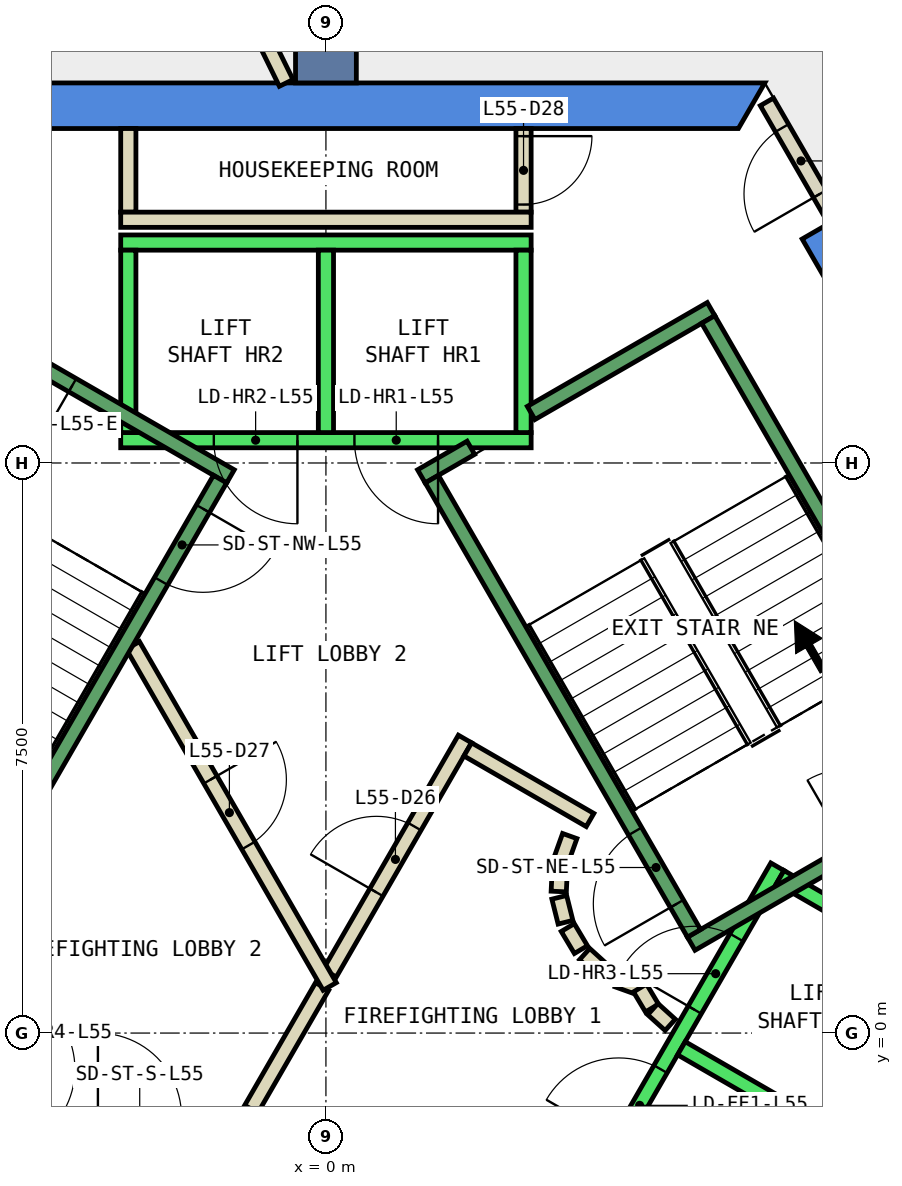
"""IFC4 building model, lengths in metres.
Left out: names, types, materials, properties, quantities, classifications, styles, units other than length and angle.
Written with IfcOpenShell. Run it as: python <this file> out.ifc"""

import sys

from ifc_helpers import new_model, si_unit, direction, frame, frame_2d, origin, place, context, subcontext, project, spatial, polyline, rectangle, outline, extrude, element, fill, save


model = new_model("IFC4")
c1 = context("Model", 3, precision=1e-05, world=origin(), true_north=direction((0.0, 1.0)))
c2 = subcontext(c1, "Body", "Model", "MODEL_VIEW")
j1 = project(units=[si_unit("LENGTHUNIT", "METRE"), si_unit("PLANEANGLEUNIT", "RADIAN")], contexts=[c1])
p1 = place(None, origin())
s1 = spatial("IfcSite", under=j1, at=p1, CompositionType="ELEMENT")
p2 = place(p1, origin())
s2 = spatial("IfcBuilding", under=s1, at=p2, CompositionType="ELEMENT")
p3 = place(p2, frame((0.0, 0.0, 245.0)))
s3 = spatial("IfcBuildingStorey", under=s2, at=p3, CompositionType="ELEMENT", Elevation=245.0)
p4 = place(p3, frame((0.0, 0.0, -0.34)))
e1 = element("IfcWall", 1, at=p4, inside=s3, PredefinedType="SHEAR", context=c2, shape_type="SweptSolid", body=[
    extrude(outline(polyline([(6.786, 10.747), (6.266, 10.447), (10.854, 2.5), (11.547, 2.5), (6.786, 10.747)])), origin(), (0.0, 0.0, 1.0), 3.6),
])
p5 = place(p3, frame((0.0, 0.0, -0.34)))
e2 = element("IfcWall", 2, at=p5, inside=s3, PredefinedType="SHEAR", context=c2, shape_type="SweptSolid", body=[
    extrude(outline(polyline([(5.774, 12.5), (-5.774, 12.5), (-5.427, 11.9), (5.427, 11.9), (5.774, 12.5)])), origin(), (0.0, 0.0, 1.0), 3.6),
])
p6 = place(p3, frame((0.0, 0.0, -0.34)))
e3 = element("IfcWall", 3, at=p6, inside=s3, PredefinedType="SHEAR", context=c2, shape_type="SweptSolid", body=[
    extrude(outline(polyline([(5.774, -7.5), (11.547, 2.5), (10.854, 2.5), (5.427, -6.9), (5.774, -7.5)])), origin(), (0.0, 0.0, 1.0), 3.6),
])
p7 = place(p3, frame((0.0, 12.5, -0.34), z_axis=(0.0, 0.0, 1.0), x_axis=(0.0, 1.0, 0.0)))
e4 = element("IfcWall", 4, at=p7, inside=s3, PredefinedType="SHEAR", context=c2, shape_type="SweptSolid", body=[
    extrude(rectangle(XDim=9.0, YDim=0.8, at=frame_2d((4.5, 0.0))), origin(), (0.0, 0.0, 1.0), 3.6),
])
p8 = place(p3, frame((-0.523, 12.5, 0.0), z_axis=(0.0, 0.0, 1.0), x_axis=(-0.440503659888, 0.897750814884, 0.0)))
e5 = element("IfcWall", 5, at=p8, inside=s3, PredefinedType="PARTITIONING", context=c2, shape_type="SweptSolid", body=[
    extrude(rectangle(XDim=1.793, YDim=0.2, at=frame_2d((0.897, 0.0))), origin(), (0.0, 0.0, 1.0), 3.26),
])
p9 = place(p3, frame((-2.6, 10.8, 0.0), z_axis=(0.0, 0.0, 1.0), x_axis=(0.0, 1.0, 0.0)))
e6 = element("IfcWall", 6, at=p9, inside=s3, PredefinedType="PARTITIONING", context=c2, shape_type="SweptSolid", body=[
    extrude(rectangle(XDim=1.1, YDim=0.2, at=frame_2d((0.55, 0.0))), origin(), (0.0, 0.0, 1.0), 3.26),
])
p10 = place(p3, frame((2.6, 11.9, 0.0), z_axis=(0.0, 0.0, 1.0), x_axis=(0.0, -1.0, 0.0)))
e7 = element("IfcWall", 7, at=p10, inside=s3, PredefinedType="PARTITIONING", context=c2, shape_type="SweptSolid", body=[
    extrude(rectangle(XDim=1.1, YDim=0.2, at=frame_2d((0.55, 0.0))), origin(), (0.0, 0.0, 1.0), 3.26),
])
p11 = place(p10, frame((0.1, 0.0, 0.0)))
e8 = element("IfcOpeningElement", 8, at=p11, cuts=e7, PredefinedType="OPENING", context=c2, shape_type="SweptSolid", body=[
    extrude(rectangle(XDim=0.9, YDim=2.1, at=frame_2d((0.45, 1.05))), frame((0.0, 0.11, 0.0), z_axis=(0.0, -1.0, 0.0), x_axis=(1.0, 0.0, 0.0)), (0.0, 0.0, 1.0), 0.22),
])
p12 = place(p3, frame((2.7, 10.7, 0.0), z_axis=(0.0, 0.0, 1.0), x_axis=(-1.0, 0.0, 0.0)))
e9 = element("IfcWall", 9, at=p12, inside=s3, PredefinedType="PARTITIONING", context=c2, shape_type="SweptSolid", body=[
    extrude(rectangle(XDim=5.4, YDim=0.2, at=frame_2d((2.7, 0.0))), origin(), (0.0, 0.0, 1.0), 3.26),
])
p13 = place(p3, frame((5.751, -3.938, 0.0), z_axis=(0.0, 0.0, 1.0), x_axis=(0.500034260056, 0.866005622828, 0.0)))
e10 = element("IfcWall", 10, at=p13, inside=s3, PredefinedType="PARTITIONING", context=c2, shape_type="SweptSolid", body=[
    extrude(rectangle(XDim=5.399, YDim=0.2, at=frame_2d((2.7, 0.0))), origin(), (0.0, 0.0, 1.0), 3.26),
])
p14 = place(p3, frame((-0.982, -1.0, 0.0), z_axis=(0.0, 0.0, 1.0), x_axis=(0.50024047865, 0.865886518847, 0.0)))
e11 = element("IfcWall", 11, at=p14, inside=s3, PredefinedType="PARTITIONING", context=c2, shape_type="SweptSolid", body=[
    extrude(rectangle(XDim=1.863, YDim=0.2, at=frame_2d((0.931, 0.0))), origin(), (0.0, 0.0, 1.0), 3.26),
])
p15 = place(p3, frame((0.05, 0.787, 0.0), z_axis=(0.0, 0.0, 1.0), x_axis=(0.499954076797, 0.866051915934, 0.0)))
e12 = element("IfcWall", 12, at=p15, inside=s3, PredefinedType="PARTITIONING", context=c2, shape_type="SweptSolid", body=[
    extrude(rectangle(XDim=3.558, YDim=0.2, at=frame_2d((1.779, 0.0))), origin(), (0.0, 0.0, 1.0), 3.26),
])
p16 = place(p15, frame((1.229, 0.0, 0.0)))
e13 = element("IfcOpeningElement", 13, at=p16, cuts=e12, PredefinedType="OPENING", context=c2, shape_type="SweptSolid", body=[
    extrude(rectangle(XDim=1.0, YDim=2.1, at=frame_2d((0.5, 1.05))), frame((0.0, 0.11, 0.0), z_axis=(0.0, -1.0, 0.0), x_axis=(1.0, 0.0, 0.0)), (0.0, 0.0, 1.0), 0.22),
])
p17 = place(p3, frame((1.866, 3.732, 0.0), z_axis=(0.0, 0.0, 1.0), x_axis=(0.866043361281, -0.499968895414, 0.0)))
e14 = element("IfcWall", 14, at=p17, inside=s3, PredefinedType="PARTITIONING", context=c2, shape_type="SweptSolid", body=[
    extrude(rectangle(XDim=1.858, YDim=0.2, at=frame_2d((0.929, 0.0))), origin(), (0.0, 0.0, 1.0), 3.26),
])
p18 = place(p3, frame((3.208, 2.592, 0.0), z_axis=(0.0, 0.0, 1.0), x_axis=(-0.337388820924, -0.941365382578, 0.0)))
e15 = element("IfcWall", 15, at=p18, inside=s3, PredefinedType="PARTITIONING", context=c2, shape_type="SweptSolid", body=[
    extrude(rectangle(XDim=0.338, YDim=0.2, at=frame_2d((0.169, 0.0))), origin(), (0.0, 0.0, 1.0), 3.26),
])
p19 = place(p3, frame((3.079, 2.199, 0.0), z_axis=(0.0, 0.0, 1.0), x_axis=(-0.047771483479, -0.998858290933, 0.0)))
e16 = element("IfcWall", 16, at=p19, inside=s3, PredefinedType="PARTITIONING", context=c2, shape_type="SweptSolid", body=[
    extrude(rectangle(XDim=0.337, YDim=0.2, at=frame_2d((0.169, 0.0))), origin(), (0.0, 0.0, 1.0), 3.26),
])
p20 = place(p3, frame((3.07, 1.786, 0.0), z_axis=(0.0, 0.0, 1.0), x_axis=(0.242705583207, -0.970099994784, 0.0)))
e17 = element("IfcWall", 17, at=p20, inside=s3, PredefinedType="PARTITIONING", context=c2, shape_type="SweptSolid", body=[
    extrude(rectangle(XDim=0.338, YDim=0.2, at=frame_2d((0.169, 0.0))), origin(), (0.0, 0.0, 1.0), 3.26),
])
for number, where, z_axis, x_axis in (
    (18, (3.182, 1.388, 0.0), (0.0, 0.0, 1.0), (0.512, -0.859, 0.0)),
    (19, (3.404, 1.039, 0.0), (0.0, 0.0, 1.0), (0.74, -0.672, 0.0)),
):
    element("IfcWall", number, at=place(p3, frame(where, z_axis=z_axis, x_axis=x_axis)), inside=s3, PredefinedType="PARTITIONING", context=c2, shape_type="SweptSolid", body=[
        extrude(rectangle(XDim=0.338, YDim=0.2, at=frame_2d((0.169, 0.0))), origin(), (0.0, 0.0, 1.0), 3.26),
    ])
p21 = place(p3, frame((3.838, 0.702, 0.0), z_axis=(0.0, 0.0, 1.0), x_axis=(0.941035081519, -0.338308993895, 0.0)))
e20 = element("IfcWall", 20, at=p21, inside=s3, PredefinedType="PARTITIONING", context=c2, shape_type="SweptSolid", body=[
    extrude(rectangle(XDim=0.337, YDim=0.2, at=frame_2d((0.168, 0.0))), origin(), (0.0, 0.0, 1.0), 3.26),
])
p22 = place(p3, frame((4.132, 0.593, 0.0), z_axis=(0.0, 0.0, 1.0), x_axis=(0.513561617048, -0.858052717201, 0.0)))
e21 = element("IfcWall", 21, at=p22, inside=s3, PredefinedType="PARTITIONING", context=c2, shape_type="SweptSolid", body=[
    extrude(rectangle(XDim=0.308, YDim=0.2, at=frame_2d((0.154, 0.0))), origin(), (0.0, 0.0, 1.0), 3.26),
])
p23 = place(p3, frame((4.301, 0.315, 0.0), z_axis=(0.0, 0.0, 1.0), x_axis=(0.741798017506, -0.670623367639, 0.0)))
e22 = element("IfcWall", 22, at=p23, inside=s3, PredefinedType="PARTITIONING", context=c2, shape_type="SweptSolid", body=[
    extrude(rectangle(XDim=0.309, YDim=0.2, at=frame_2d((0.154, 0.0))), origin(), (0.0, 0.0, 1.0), 3.26),
])
p24 = place(p3, frame((-2.54, 5.1, 0.0), z_axis=(0.0, 0.0, 1.0), x_axis=(0.499925051871, -0.866068670783, 0.0)))
e23 = element("IfcWall", 23, at=p24, inside=s3, PredefinedType="PARTITIONING", context=c2, shape_type="SweptSolid", body=[
    extrude(rectangle(XDim=5.181, YDim=0.2, at=frame_2d((2.59, 0.0))), origin(), (0.0, 0.0, 1.0), 3.26),
])
p25 = place(p24, frame((2.04, 0.0, 0.0)))
e24 = element("IfcOpeningElement", 24, at=p25, cuts=e23, PredefinedType="OPENING", context=c2, shape_type="SweptSolid", body=[
    extrude(rectangle(XDim=1.0, YDim=2.1, at=frame_2d((0.5, 1.05))), frame((0.0, 0.11, 0.0), z_axis=(0.0, -1.0, 0.0), x_axis=(1.0, 0.0, 0.0)), (0.0, 0.0, 1.0), 0.22),
])
p26 = place(p3, frame((6.699, 10.697, 0.0), z_axis=(0.0, 0.0, 1.0), x_axis=(-0.499914839587, 0.866074565589, 0.0)))
e25 = element("IfcWall", 25, at=p26, inside=s3, PredefinedType="PARTITIONING", context=c2, shape_type="SweptSolid", body=[
    extrude(rectangle(XDim=1.794, YDim=0.2, at=frame_2d((0.897, 0.0))), origin(), (0.0, 0.0, 1.0), 2.4),
])
p27 = place(p26, frame((0.397, 0.0, 0.0)))
e26 = element("IfcOpeningElement", 26, at=p27, cuts=e25, PredefinedType="OPENING", context=c2, shape_type="SweptSolid", body=[
    extrude(rectangle(XDim=1.0, YDim=2.1, at=frame_2d((0.5, 1.05))), frame((0.0, 0.11, 0.0), z_axis=(0.0, -1.0, 0.0), x_axis=(1.0, 0.0, 0.0)), (0.0, 0.0, 1.0), 0.22),
])
p28 = place(p3, frame((2.7, 7.8, 0.0), z_axis=(0.0, 0.0, 1.0), x_axis=(-1.0, 0.0, 0.0)))
e27 = element("IfcWall", 27, at=p28, inside=s3, PredefinedType="STANDARD", context=c2, shape_type="SweptSolid", body=[
    extrude(rectangle(XDim=5.4, YDim=0.2, at=frame_2d((2.7, 0.0))), origin(), (0.0, 0.0, 1.0), 3.26),
])
p29 = place(p28, frame((1.225, 0.0, 0.0)))
e28 = element("IfcOpeningElement", 28, at=p29, cuts=e27, PredefinedType="OPENING", context=c2, shape_type="SweptSolid", body=[
    extrude(rectangle(XDim=1.1, YDim=2.1, at=frame_2d((0.55, 1.05))), frame((0.0, 0.11, 0.0), z_axis=(0.0, -1.0, 0.0), x_axis=(1.0, 0.0, 0.0)), (0.0, 0.0, 1.0), 0.22),
])
p30 = place(p28, frame((3.075, 0.0, 0.0)))
e29 = element("IfcOpeningElement", 29, at=p30, cuts=e27, PredefinedType="OPENING", context=c2, shape_type="SweptSolid", body=[
    extrude(rectangle(XDim=1.1, YDim=2.1, at=frame_2d((0.55, 1.05))), frame((0.0, 0.11, 0.0), z_axis=(0.0, -1.0, 0.0), x_axis=(1.0, 0.0, 0.0)), (0.0, 0.0, 1.0), 0.22),
])
p31 = place(p3, frame((2.7, 10.4, 0.0), z_axis=(0.0, 0.0, 1.0), x_axis=(-1.0, 0.0, 0.0)))
e30 = element("IfcWall", 30, at=p31, inside=s3, PredefinedType="STANDARD", context=c2, shape_type="SweptSolid", body=[
    extrude(rectangle(XDim=5.4, YDim=0.2, at=frame_2d((2.7, 0.0))), origin(), (0.0, 0.0, 1.0), 3.26),
])
for number, where, z_axis, x_axis in (
    (31, (2.6, 7.9, 0.0), (0.0, 0.0, 1.0), (0.0, 1.0, 0.0)),
    (32, (0.0, 7.9, 0.0), (0.0, 0.0, 1.0), (0.0, 1.0, 0.0)),
    (33, (-2.6, 7.9, 0.0), (0.0, 0.0, 1.0), (0.0, 1.0, 0.0)),
):
    element("IfcWall", number, at=place(p3, frame(where, z_axis=z_axis, x_axis=x_axis)), inside=s3, PredefinedType="STANDARD", context=c2, shape_type="SweptSolid", body=[
        extrude(rectangle(XDim=2.4, YDim=0.2, at=frame_2d((1.2, 0.0))), origin(), (0.0, 0.0, 1.0), 3.26),
    ])
p32 = place(p3, frame((-5.94, 2.188, 0.0), z_axis=(0.0, 0.0, 1.0), x_axis=(0.500034260056, -0.866005622828, 0.0)))
e34 = element("IfcWall", 34, at=p32, inside=s3, PredefinedType="STANDARD", context=c2, shape_type="SweptSolid", body=[
    extrude(rectangle(XDim=5.399, YDim=0.2, at=frame_2d((2.7, 0.0))), origin(), (0.0, 0.0, 1.0), 3.26),
])
p33 = place(p32, frame((3.075, 0.0, 0.0)))
e35 = element("IfcOpeningElement", 35, at=p33, cuts=e34, PredefinedType="OPENING", context=c2, shape_type="SweptSolid", body=[
    extrude(rectangle(XDim=1.1, YDim=2.1, at=frame_2d((0.55, 1.05))), frame((0.0, 0.11, 0.0), z_axis=(0.0, -1.0, 0.0), x_axis=(1.0, 0.0, 0.0)), (0.0, 0.0, 1.0), 0.22),
])
p34 = place(p32, frame((1.225, 0.0, 0.0)))
e36 = element("IfcOpeningElement", 36, at=p34, cuts=e34, PredefinedType="OPENING", context=c2, shape_type="SweptSolid", body=[
    extrude(rectangle(XDim=1.1, YDim=2.1, at=frame_2d((0.55, 1.05))), frame((0.0, 0.11, 0.0), z_axis=(0.0, -1.0, 0.0), x_axis=(1.0, 0.0, 0.0)), (0.0, 0.0, 1.0), 0.22),
])
p35 = place(p3, frame((3.24, -2.488, 0.0), z_axis=(0.0, 0.0, 1.0), x_axis=(0.500034260056, 0.866005622828, 0.0)))
e37 = element("IfcWall", 37, at=p35, inside=s3, PredefinedType="STANDARD", context=c2, shape_type="SweptSolid", body=[
    extrude(rectangle(XDim=5.399, YDim=0.2, at=frame_2d((2.7, 0.0))), origin(), (0.0, 0.0, 1.0), 3.26),
])
p36 = place(p35, frame((3.225, 0.0, 0.0)))
e38 = element("IfcOpeningElement", 38, at=p36, cuts=e37, PredefinedType="OPENING", context=c2, shape_type="SweptSolid", body=[
    extrude(rectangle(XDim=1.1, YDim=2.1, at=frame_2d((0.55, 1.05))), frame((0.0, 0.11, 0.0), z_axis=(0.0, -1.0, 0.0), x_axis=(1.0, 0.0, 0.0)), (0.0, 0.0, 1.0), 0.22),
])
p37 = place(p35, frame((1.225, 0.0, 0.0)))
e39 = element("IfcOpeningElement", 39, at=p37, cuts=e37, PredefinedType="OPENING", context=c2, shape_type="SweptSolid", body=[
    extrude(rectangle(XDim=1.1, YDim=2.1, at=frame_2d((0.55, 1.05))), frame((0.0, 0.11, 0.0), z_axis=(0.0, -1.0, 0.0), x_axis=(1.0, 0.0, 0.0)), (0.0, 0.0, 1.0), 0.22),
])
p38 = place(p3, frame((5.492, -3.788, 0.0), z_axis=(0.0, 0.0, 1.0), x_axis=(0.500034260056, 0.866005622828, 0.0)))
e40 = element("IfcWall", 40, at=p38, inside=s3, PredefinedType="STANDARD", context=c2, shape_type="SweptSolid", body=[
    extrude(rectangle(XDim=5.399, YDim=0.2, at=frame_2d((2.7, 0.0))), origin(), (0.0, 0.0, 1.0), 3.26),
])
for number, where, z_axis, x_axis in (
    (41, (4.677, -0.2, 0.0), (0.0, 0.0, 1.0), (0.866, -0.5, 0.0)),
    (42, (5.977, 2.052, 0.0), (0.0, 0.0, 1.0), (0.866, -0.5, 0.0)),
):
    element("IfcWall", number, at=place(p3, frame(where, z_axis=z_axis, x_axis=x_axis)), inside=s3, PredefinedType="STANDARD", context=c2, shape_type="SweptSolid", body=[
        extrude(rectangle(XDim=2.399, YDim=0.2, at=frame_2d((1.2, 0.0))), origin(), (0.0, 0.0, 1.0), 3.26),
    ])
p39 = place(p3, frame((4.806, 1.176, 0.0), z_axis=(0.0, 0.0, 1.0), x_axis=(0.866059941101, 0.499940174841, 0.0)))
e43 = element("IfcWall", 43, at=p39, inside=s3, PredefinedType="STANDARD", context=c2, shape_type="SweptSolid", body=[
    extrude(rectangle(XDim=4.4, YDim=0.2, at=frame_2d((2.2, 0.0))), origin(), (0.0, 0.0, 1.0), 3.26),
])
p40 = place(p39, frame((2.4, 0.0, 0.0)))
e44 = element("IfcOpeningElement", 44, at=p40, cuts=e43, PredefinedType="OPENING", context=c2, shape_type="SweptSolid", body=[
    extrude(rectangle(XDim=1.1, YDim=2.2, at=frame_2d((0.55, 1.1))), frame((0.0, 0.11, 0.0), z_axis=(0.0, -1.0, 0.0), x_axis=(1.0, 0.0, 0.0)), (0.0, 0.0, 1.0), 0.22),
])
p41 = place(p3, frame((2.7, 8.158, 0.0), z_axis=(0.0, 0.0, 1.0), x_axis=(0.86611865017, 0.499838457731, 0.0)))
e45 = element("IfcWall", 45, at=p41, inside=s3, PredefinedType="STANDARD", context=c2, shape_type="SweptSolid", body=[
    extrude(rectangle(XDim=2.733, YDim=0.2, at=frame_2d((1.366, 0.0))), origin(), (0.0, 0.0, 1.0), 3.26),
])
p42 = place(p3, frame((1.256, 7.324, 0.0), z_axis=(0.0, 0.0, 1.0), x_axis=(0.865915093549, 0.500191014278, 0.0)))
e46 = element("IfcWall", 46, at=p42, inside=s3, PredefinedType="STANDARD", context=c2, shape_type="SweptSolid", body=[
    extrude(rectangle(XDim=0.752, YDim=0.2, at=frame_2d((0.376, 0.0))), origin(), (0.0, 0.0, 1.0), 3.26),
])
p43 = place(p3, frame((4.843, 1.312, 0.0), z_axis=(0.0, 0.0, 1.0), x_axis=(-0.499963383562, 0.866046543262, 0.0)))
e47 = element("IfcWall", 47, at=p43, inside=s3, PredefinedType="STANDARD", context=c2, shape_type="SweptSolid", body=[
    extrude(rectangle(XDim=6.9, YDim=0.2, at=frame_2d((3.45, 0.0))), origin(), (0.0, 0.0, 1.0), 3.26),
])
p44 = place(p43, frame((0.45, 0.0, 0.0)))
e48 = element("IfcOpeningElement", 48, at=p44, cuts=e47, PredefinedType="OPENING", context=c2, shape_type="SweptSolid", body=[
    extrude(rectangle(XDim=1.1, YDim=2.2, at=frame_2d((0.55, 1.1))), frame((0.0, 0.11, 0.0), z_axis=(0.0, -1.0, 0.0), x_axis=(1.0, 0.0, 0.0)), (0.0, 0.0, 1.0), 0.22),
])
p45 = place(p3, frame((8.48, 3.412, 0.0), z_axis=(0.0, 0.0, 1.0), x_axis=(-0.499978703459, 0.866037698999, 0.0)))
e49 = element("IfcWall", 49, at=p45, inside=s3, PredefinedType="STANDARD", context=c2, shape_type="SweptSolid", body=[
    extrude(rectangle(XDim=6.9, YDim=0.2, at=frame_2d((3.45, 0.0))), origin(), (0.0, 0.0, 1.0), 3.26),
])
p46 = place(p3, frame((-1.256, 7.324, 0.0), z_axis=(0.0, 0.0, 1.0), x_axis=(-0.866046073146, 0.499964197906, 0.0)))
e50 = element("IfcWall", 50, at=p46, inside=s3, PredefinedType="STANDARD", context=c2, shape_type="SweptSolid", body=[
    extrude(rectangle(XDim=4.4, YDim=0.2, at=frame_2d((2.2, 0.0))), origin(), (0.0, 0.0, 1.0), 3.26),
])
p47 = place(p46, frame((2.4, 0.0, 0.0)))
e51 = element("IfcOpeningElement", 51, at=p47, cuts=e50, PredefinedType="OPENING", context=c2, shape_type="SweptSolid", body=[
    extrude(rectangle(XDim=1.1, YDim=2.2, at=frame_2d((0.55, 1.1))), frame((0.0, 0.11, 0.0), z_axis=(0.0, -1.0, 0.0), x_axis=(1.0, 0.0, 0.0)), (0.0, 0.0, 1.0), 0.22),
])
p48 = place(p3, frame((-1.393, 7.288, 0.0), z_axis=(0.0, 0.0, 1.0), x_axis=(-0.499963383562, -0.866046543262, 0.0)))
e52 = element("IfcWall", 52, at=p48, inside=s3, PredefinedType="STANDARD", context=c2, shape_type="SweptSolid", body=[
    extrude(rectangle(XDim=6.9, YDim=0.2, at=frame_2d((3.45, 0.0))), origin(), (0.0, 0.0, 1.0), 3.26),
])
p49 = place(p48, frame((0.45, 0.0, 0.0)))
e53 = element("IfcOpeningElement", 53, at=p49, cuts=e52, PredefinedType="OPENING", context=c2, shape_type="SweptSolid", body=[
    extrude(rectangle(XDim=1.1, YDim=2.2, at=frame_2d((0.55, 1.1))), frame((0.0, 0.11, 0.0), z_axis=(0.0, -1.0, 0.0), x_axis=(1.0, 0.0, 0.0)), (0.0, 0.0, 1.0), 0.22),
])
p50 = place(p16, origin())
e54 = element("IfcDoor", 54, at=p50, inside=s3, OperationType="SINGLE_SWING_RIGHT", PredefinedType="DOOR", context=c2, shape_type="SweptSolid", body=[
    extrude(rectangle(XDim=1.0, YDim=2.1, at=frame_2d((0.5, 1.05))), frame((0.0, 0.025, 0.0), z_axis=(0.0, -1.0, 0.0), x_axis=(1.0, 0.0, 0.0)), (0.0, 0.0, 1.0), 0.05),
])
fill(e13, e54)
p51 = place(p25, origin())
e55 = element("IfcDoor", 55, at=p51, inside=s3, OperationType="SINGLE_SWING_RIGHT", PredefinedType="DOOR", context=c2, shape_type="SweptSolid", body=[
    extrude(rectangle(XDim=1.0, YDim=2.1, at=frame_2d((0.5, 1.05))), frame((0.0, 0.025, 0.0), z_axis=(0.0, -1.0, 0.0), x_axis=(1.0, 0.0, 0.0)), (0.0, 0.0, 1.0), 0.05),
])
fill(e24, e55)
p52 = place(p11, origin())
e56 = element("IfcDoor", 56, at=p52, inside=s3, OperationType="SINGLE_SWING_LEFT", PredefinedType="DOOR", context=c2, shape_type="SweptSolid", body=[
    extrude(rectangle(XDim=0.9, YDim=2.1, at=frame_2d((0.45, 1.05))), frame((0.0, 0.025, 0.0), z_axis=(0.0, -1.0, 0.0), x_axis=(1.0, 0.0, 0.0)), (0.0, 0.0, 1.0), 0.05),
])
fill(e8, e56)
p53 = place(p27, origin())
e57 = element("IfcDoor", 57, at=p53, inside=s3, OperationType="SINGLE_SWING_LEFT", PredefinedType="DOOR", context=c2, shape_type="SweptSolid", body=[
    extrude(rectangle(XDim=1.0, YDim=2.1, at=frame_2d((0.5, 1.05))), frame((0.0, 0.025, 0.0), z_axis=(0.0, -1.0, 0.0), x_axis=(1.0, 0.0, 0.0)), (0.0, 0.0, 1.0), 0.05),
])
fill(e26, e57)
p54 = place(p29, origin())
e58 = element("IfcDoor", 58, at=p54, inside=s3, OperationType="SLIDING_TO_LEFT", PredefinedType="DOOR", context=c2, shape_type="SweptSolid", body=[
    extrude(rectangle(XDim=1.1, YDim=2.1, at=frame_2d((0.55, 1.05))), frame((0.0, 0.025, 0.0), z_axis=(0.0, -1.0, 0.0), x_axis=(1.0, 0.0, 0.0)), (0.0, 0.0, 1.0), 0.05),
])
fill(e28, e58)
p55 = place(p30, origin())
e59 = element("IfcDoor", 59, at=p55, inside=s3, OperationType="SLIDING_TO_LEFT", PredefinedType="DOOR", context=c2, shape_type="SweptSolid", body=[
    extrude(rectangle(XDim=1.1, YDim=2.1, at=frame_2d((0.55, 1.05))), frame((0.0, 0.025, 0.0), z_axis=(0.0, -1.0, 0.0), x_axis=(1.0, 0.0, 0.0)), (0.0, 0.0, 1.0), 0.05),
])
fill(e29, e59)
p56 = place(p36, origin())
e60 = element("IfcDoor", 60, at=p56, inside=s3, OperationType="SLIDING_TO_LEFT", PredefinedType="DOOR", context=c2, shape_type="SweptSolid", body=[
    extrude(rectangle(XDim=1.1, YDim=2.1, at=frame_2d((0.55, 1.05))), frame((0.0, 0.025, 0.0), z_axis=(0.0, -1.0, 0.0), x_axis=(1.0, 0.0, 0.0)), (0.0, 0.0, 1.0), 0.05),
])
fill(e38, e60)
p57 = place(p37, origin())
e61 = element("IfcDoor", 61, at=p57, inside=s3, OperationType="SLIDING_TO_LEFT", PredefinedType="DOOR", context=c2, shape_type="SweptSolid", body=[
    extrude(rectangle(XDim=1.1, YDim=2.1, at=frame_2d((0.55, 1.05))), frame((0.0, 0.025, 0.0), z_axis=(0.0, -1.0, 0.0), x_axis=(1.0, 0.0, 0.0)), (0.0, 0.0, 1.0), 0.05),
])
fill(e39, e61)
p58 = place(p44, origin())
e62 = element("IfcDoor", 62, at=p58, inside=s3, OperationType="SINGLE_SWING_LEFT", PredefinedType="DOOR", context=c2, shape_type="SweptSolid", body=[
    extrude(rectangle(XDim=1.1, YDim=2.2, at=frame_2d((0.55, 1.1))), frame((0.0, 0.025, 0.0), z_axis=(0.0, -1.0, 0.0), x_axis=(1.0, 0.0, 0.0)), (0.0, 0.0, 1.0), 0.05),
])
fill(e48, e62)
p59 = place(p49, origin())
e63 = element("IfcDoor", 63, at=p59, inside=s3, OperationType="SINGLE_SWING_LEFT", PredefinedType="DOOR", context=c2, shape_type="SweptSolid", body=[
    extrude(rectangle(XDim=1.1, YDim=2.2, at=frame_2d((0.55, 1.1))), frame((0.0, 0.025, 0.0), z_axis=(0.0, -1.0, 0.0), x_axis=(1.0, 0.0, 0.0)), (0.0, 0.0, 1.0), 0.05),
])
fill(e53, e63)
p60 = place(p47, origin())
e64 = element("IfcDoor", 64, at=p60, inside=s3, OperationType="SINGLE_SWING_LEFT", PredefinedType="DOOR", context=c2, shape_type="SweptSolid", body=[
    extrude(rectangle(XDim=1.1, YDim=2.2, at=frame_2d((0.55, 1.1))), frame((0.0, 0.025, 0.0), z_axis=(0.0, -1.0, 0.0), x_axis=(1.0, 0.0, 0.0)), (0.0, 0.0, 1.0), 0.05),
])
fill(e51, e64)
save(model, sys.argv[1])
